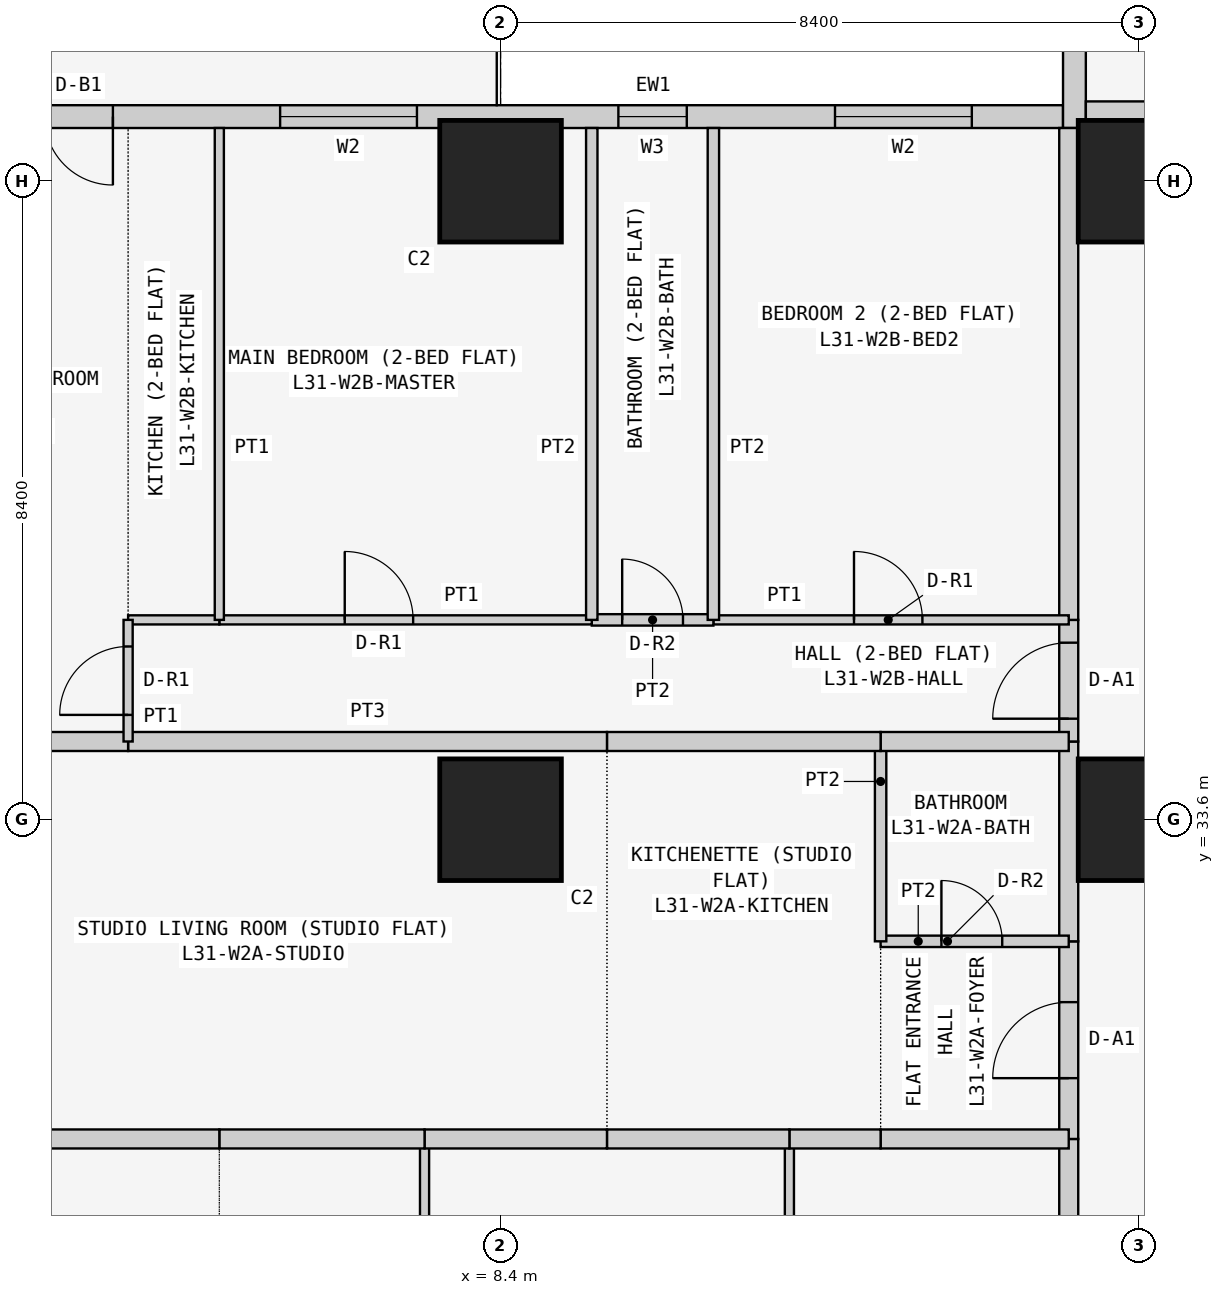
"""IFC4 building model, lengths in metres.
Left out: names, types, materials, properties, quantities, classifications, styles, units other than length and angle.
Written with IfcOpenShell. Run it as: python <this file> out.ifc"""

import sys

from ifc_helpers import new_model, si_unit, direction, frame, frame_2d, origin, origin_2d, place, context, subcontext, project, spatial, rectangle, extrude, element, fill, save


model = new_model("IFC4")
c1 = context("Model", 3, precision=1e-05, world=origin(), true_north=direction((0.0, 1.0)))
c2 = subcontext(c1, "Body", "Model", "MODEL_VIEW")
j1 = project(units=[si_unit("LENGTHUNIT", "METRE"), si_unit("PLANEANGLEUNIT", "RADIAN")], contexts=[c1])
p1 = place(None, origin())
s1 = spatial("IfcSite", under=j1, at=p1, CompositionType="ELEMENT")
p2 = place(p1, origin())
s2 = spatial("IfcBuilding", under=s1, at=p2, CompositionType="ELEMENT")
p3 = place(p2, frame((0.0, 0.0, 123.3)))
s3 = spatial("IfcBuildingStorey", under=s2, at=p3, CompositionType="ELEMENT", Elevation=123.3)
for number, where, z_axis, x_axis in (
    (1, (8.4, 33.6, 0.0), (0.0, 0.0, 1.0), (1.0, 0.0, 0.0)),
    (2, (8.4, 42.0, 0.0), (0.0, 0.0, 1.0), (1.0, 0.0, 0.0)),
    (3, (16.8, 33.6, 0.0), (0.0, 0.0, 1.0), (1.0, 0.0, 0.0)),
    (4, (16.8, 42.0, 0.0), (0.0, 0.0, 1.0), (1.0, 0.0, 0.0)),
):
    element("IfcColumn", number, at=place(p3, frame(where, z_axis=z_axis, x_axis=x_axis)), inside=s3, PredefinedType="COLUMN", context=c2, shape_type="SweptSolid", body=[
        extrude(rectangle(XDim=1.6, YDim=1.6, at=origin_2d()), origin(), (0.0, 0.0, 1.0), 3.6),
    ])
p4 = place(p3, frame((15.8, 42.85, 0.0), z_axis=(0.0, 0.0, 1.0), x_axis=(-1.0, 0.0, 0.0)))
e5 = element("IfcWall", 5, at=p4, inside=s3, PredefinedType="SOLIDWALL", context=c2, shape_type="SweptSolid", body=[
    extrude(rectangle(XDim=15.4, YDim=0.3, at=frame_2d((7.7, 0.0))), origin(), (0.0, 0.0, 1.0), 3.45),
])
p5 = place(p4, frame((1.2, 0.0, 0.9)))
e6 = element("IfcOpeningElement", 6, at=p5, cuts=e5, PredefinedType="OPENING", context=c2, shape_type="SweptSolid", body=[
    extrude(rectangle(XDim=1.8, YDim=1.5, at=frame_2d((0.9, 0.75))), frame((0.0, 0.16, 0.0), z_axis=(0.0, -1.0, 0.0), x_axis=(1.0, 0.0, 0.0)), (0.0, 0.0, 1.0), 0.32),
])
p6 = place(p4, frame((4.95, 0.0, 1.5)))
e7 = element("IfcOpeningElement", 7, at=p6, cuts=e5, PredefinedType="OPENING", context=c2, shape_type="SweptSolid", body=[
    extrude(rectangle(XDim=0.9, YDim=0.7, at=frame_2d((0.45, 0.35))), frame((0.0, 0.16, 0.0), z_axis=(0.0, -1.0, 0.0), x_axis=(1.0, 0.0, 0.0)), (0.0, 0.0, 1.0), 0.32),
])
p7 = place(p4, frame((8.5, 0.0, 0.9)))
e8 = element("IfcOpeningElement", 8, at=p7, cuts=e5, PredefinedType="OPENING", context=c2, shape_type="SweptSolid", body=[
    extrude(rectangle(XDim=1.8, YDim=1.5, at=frame_2d((0.9, 0.75))), frame((0.0, 0.16, 0.0), z_axis=(0.0, -1.0, 0.0), x_axis=(1.0, 0.0, 0.0)), (0.0, 0.0, 1.0), 0.32),
])
p8 = place(p4, frame((12.5, 0.0, 0.0)))
e9 = element("IfcOpeningElement", 9, at=p8, cuts=e5, PredefinedType="OPENING", context=c2, shape_type="SweptSolid", body=[
    extrude(rectangle(XDim=0.9, YDim=2.4, at=frame_2d((0.45, 1.2))), frame((0.0, 0.16, 0.0), z_axis=(0.0, -1.0, 0.0), x_axis=(1.0, 0.0, 0.0)), (0.0, 0.0, 1.0), 0.32),
])
p9 = place(p4, frame((13.5, 0.0, 0.9)))
e10 = element("IfcOpeningElement", 10, at=p9, cuts=e5, PredefinedType="OPENING", context=c2, shape_type="SweptSolid", body=[
    extrude(rectangle(XDim=1.2, YDim=1.5, at=frame_2d((0.6, 0.75))), frame((0.0, 0.16, 0.0), z_axis=(0.0, -1.0, 0.0), x_axis=(1.0, 0.0, 0.0)), (0.0, 0.0, 1.0), 0.32),
])
p10 = place(p3, frame((15.95, 50.0, 0.0), z_axis=(0.0, 0.0, 1.0), x_axis=(0.0, -1.0, 0.0)))
e11 = element("IfcWall", 11, at=p10, inside=s3, PredefinedType="SOLIDWALL", context=c2, shape_type="SweptSolid", body=[
    extrude(rectangle(XDim=7.3, YDim=0.3, at=frame_2d((3.65, 0.0))), origin(), (0.0, 0.0, 1.0), 3.45),
])
p11 = place(p10, frame((3.1, 0.0, 0.9)))
e12 = element("IfcOpeningElement", 12, at=p11, cuts=e11, PredefinedType="OPENING", context=c2, shape_type="SweptSolid", body=[
    extrude(rectangle(XDim=2.4, YDim=1.5, at=frame_2d((1.2, 0.75))), frame((0.0, 0.16, 0.0), z_axis=(0.0, -1.0, 0.0), x_axis=(1.0, 0.0, 0.0)), (0.0, 0.0, 1.0), 0.32),
])
p12 = place(p10, frame((0.75, 0.0, 0.9)))
e13 = element("IfcOpeningElement", 13, at=p12, cuts=e11, PredefinedType="OPENING", context=c2, shape_type="SweptSolid", body=[
    extrude(rectangle(XDim=1.2, YDim=1.5, at=frame_2d((0.6, 0.75))), frame((0.0, 0.16, 0.0), z_axis=(0.0, -1.0, 0.0), x_axis=(1.0, 0.0, 0.0)), (0.0, 0.0, 1.0), 0.32),
])
p13 = place(p3, frame((16.1, 42.925, 0.0), z_axis=(0.0, 0.0, 1.0), x_axis=(1.0, 0.0, 0.0)))
e14 = element("IfcWall", 14, at=p13, inside=s3, PredefinedType="PARTITIONING", context=c2, shape_type="SweptSolid", body=[
    extrude(rectangle(XDim=6.871, YDim=0.25, at=frame_2d((3.436, 0.0))), origin(), (0.0, 0.0, 1.0), 3.45),
])
p14 = place(p3, frame((15.875, 24.171, 0.0), z_axis=(0.0, 0.0, 1.0), x_axis=(0.0, 1.0, 0.0)))
e15 = element("IfcWall", 15, at=p14, inside=s3, PredefinedType="PARTITIONING", context=c2, shape_type="SweptSolid", body=[
    extrude(rectangle(XDim=5.229, YDim=0.25, at=frame_2d((2.615, 0.0))), origin(), (0.0, 0.0, 1.0), 3.45),
])
p15 = place(p14, frame((2.129, 0.0, 0.0)))
e16 = element("IfcOpeningElement", 16, at=p15, cuts=e15, PredefinedType="OPENING", context=c2, shape_type="SweptSolid", body=[
    extrude(rectangle(XDim=1.0, YDim=2.1, at=frame_2d((0.5, 1.05))), frame((0.0, 0.135, 0.0), z_axis=(0.0, -1.0, 0.0), x_axis=(1.0, 0.0, 0.0)), (0.0, 0.0, 1.0), 0.27),
])
p16 = place(p3, frame((15.875, 29.4, 0.0), z_axis=(0.0, 0.0, 1.0), x_axis=(0.0, 1.0, 0.0)))
e17 = element("IfcWall", 17, at=p16, inside=s3, PredefinedType="PARTITIONING", context=c2, shape_type="SweptSolid", body=[
    extrude(rectangle(XDim=2.6, YDim=0.25, at=frame_2d((1.3, 0.0))), origin(), (0.0, 0.0, 1.0), 3.45),
])
p17 = place(p16, frame((0.8, 0.0, 0.0)))
e18 = element("IfcOpeningElement", 18, at=p17, cuts=e17, PredefinedType="OPENING", context=c2, shape_type="SweptSolid", body=[
    extrude(rectangle(XDim=1.0, YDim=2.1, at=frame_2d((0.5, 1.05))), frame((0.0, 0.135, 0.0), z_axis=(0.0, -1.0, 0.0), x_axis=(1.0, 0.0, 0.0)), (0.0, 0.0, 1.0), 0.27),
])
p18 = place(p3, frame((15.875, 32.0, 0.0), z_axis=(0.0, 0.0, 1.0), x_axis=(0.0, 1.0, 0.0)))
e19 = element("IfcWall", 19, at=p18, inside=s3, PredefinedType="PARTITIONING", context=c2, shape_type="SweptSolid", body=[
    extrude(rectangle(XDim=2.629, YDim=0.25, at=frame_2d((1.314, 0.0))), origin(), (0.0, 0.0, 1.0), 3.45),
])
p19 = place(p3, frame((15.875, 34.629, 0.0), z_axis=(0.0, 0.0, 1.0), x_axis=(0.0, 1.0, 0.0)))
e20 = element("IfcWall", 20, at=p19, inside=s3, PredefinedType="PARTITIONING", context=c2, shape_type="SweptSolid", body=[
    extrude(rectangle(XDim=1.6, YDim=0.25, at=frame_2d((0.8, 0.0))), origin(), (0.0, 0.0, 1.0), 3.45),
])
p20 = place(p19, frame((0.3, 0.0, 0.0)))
e21 = element("IfcOpeningElement", 21, at=p20, cuts=e20, PredefinedType="OPENING", context=c2, shape_type="SweptSolid", body=[
    extrude(rectangle(XDim=1.0, YDim=2.1, at=frame_2d((0.5, 1.05))), frame((0.0, 0.135, 0.0), z_axis=(0.0, -1.0, 0.0), x_axis=(1.0, 0.0, 0.0)), (0.0, 0.0, 1.0), 0.27),
])
p21 = place(p3, frame((15.875, 36.229, 0.0), z_axis=(0.0, 0.0, 1.0), x_axis=(0.0, 1.0, 0.0)))
e22 = element("IfcWall", 22, at=p21, inside=s3, PredefinedType="PARTITIONING", context=c2, shape_type="SweptSolid", body=[
    extrude(rectangle(XDim=6.471, YDim=0.25, at=frame_2d((3.235, 0.0))), origin(), (0.0, 0.0, 1.0), 3.45),
])
p22 = place(p3, frame((12.2, 29.4, 0.0), z_axis=(0.0, 0.0, 1.0), x_axis=(0.0, -1.0, 0.0)))
e23 = element("IfcWall", 23, at=p22, inside=s3, PredefinedType="PARTITIONING", context=c2, shape_type="SweptSolid", body=[
    extrude(rectangle(XDim=5.229, YDim=0.12, at=frame_2d((2.615, 0.0))), origin(), (0.0, 0.0, 1.0), 3.45),
])
p23 = place(p3, frame((15.875, 29.4, 0.0), z_axis=(0.0, 0.0, 1.0), x_axis=(-1.0, 0.0, 0.0)))
e24 = element("IfcWall", 24, at=p23, inside=s3, PredefinedType="PARTITIONING", context=c2, shape_type="SweptSolid", body=[
    extrude(rectangle(XDim=2.475, YDim=0.25, at=frame_2d((1.238, 0.0))), origin(), (0.0, 0.0, 1.0), 3.45),
])
p24 = place(p3, frame((13.4, 29.4, 0.0), z_axis=(0.0, 0.0, 1.0), x_axis=(-1.0, 0.0, 0.0)))
e25 = element("IfcWall", 25, at=p24, inside=s3, PredefinedType="PARTITIONING", context=c2, shape_type="SweptSolid", body=[
    extrude(rectangle(XDim=1.2, YDim=0.25, at=frame_2d((0.6, 0.0))), origin(), (0.0, 0.0, 1.0), 3.45),
])
p25 = place(p3, frame((7.4, 29.4, 0.0), z_axis=(0.0, 0.0, 1.0), x_axis=(0.0, -1.0, 0.0)))
e26 = element("IfcWall", 26, at=p25, inside=s3, PredefinedType="PARTITIONING", context=c2, shape_type="SweptSolid", body=[
    extrude(rectangle(XDim=5.229, YDim=0.12, at=frame_2d((2.615, 0.0))), origin(), (0.0, 0.0, 1.0), 3.45),
])
p26 = place(p3, frame((12.2, 29.4, 0.0), z_axis=(0.0, 0.0, 1.0), x_axis=(-1.0, 0.0, 0.0)))
e27 = element("IfcWall", 27, at=p26, inside=s3, PredefinedType="PARTITIONING", context=c2, shape_type="SweptSolid", body=[
    extrude(rectangle(XDim=2.4, YDim=0.25, at=frame_2d((1.2, 0.0))), origin(), (0.0, 0.0, 1.0), 3.45),
])
p27 = place(p3, frame((9.8, 29.4, 0.0), z_axis=(0.0, 0.0, 1.0), x_axis=(-1.0, 0.0, 0.0)))
e28 = element("IfcWall", 28, at=p27, inside=s3, PredefinedType="PARTITIONING", context=c2, shape_type="SweptSolid", body=[
    extrude(rectangle(XDim=2.4, YDim=0.25, at=frame_2d((1.2, 0.0))), origin(), (0.0, 0.0, 1.0), 3.45),
])
p28 = place(p3, frame((7.4, 29.4, 0.0), z_axis=(0.0, 0.0, 1.0), x_axis=(-1.0, 0.0, 0.0)))
e29 = element("IfcWall", 29, at=p28, inside=s3, PredefinedType="PARTITIONING", context=c2, shape_type="SweptSolid", body=[
    extrude(rectangle(XDim=2.7, YDim=0.25, at=frame_2d((1.35, 0.0))), origin(), (0.0, 0.0, 1.0), 3.45),
])
p29 = place(p3, frame((4.7, 29.4, 0.0), z_axis=(0.0, 0.0, 1.0), x_axis=(-1.0, 0.0, 0.0)))
e30 = element("IfcWall", 30, at=p29, inside=s3, PredefinedType="PARTITIONING", context=c2, shape_type="SweptSolid", body=[
    extrude(rectangle(XDim=5.35, YDim=0.25, at=frame_2d((2.675, 0.0))), origin(), (0.0, 0.0, 1.0), 3.45),
])
p30 = place(p3, frame((13.4, 32.0, 0.0), z_axis=(0.0, 0.0, 1.0), x_axis=(1.0, 0.0, 0.0)))
e31 = element("IfcWall", 31, at=p30, inside=s3, PredefinedType="PARTITIONING", context=c2, shape_type="SweptSolid", body=[
    extrude(rectangle(XDim=2.475, YDim=0.15, at=frame_2d((1.238, 0.0))), origin(), (0.0, 0.0, 1.0), 3.45),
])
p31 = place(p30, frame((0.8, 0.0, 0.0)))
e32 = element("IfcOpeningElement", 32, at=p31, cuts=e31, PredefinedType="OPENING", context=c2, shape_type="SweptSolid", body=[
    extrude(rectangle(XDim=0.8, YDim=2.1, at=frame_2d((0.4, 1.05))), frame((0.0, 0.085, 0.0), z_axis=(0.0, -1.0, 0.0), x_axis=(1.0, 0.0, 0.0)), (0.0, 0.0, 1.0), 0.17),
])
p32 = place(p3, frame((13.4, 32.0, 0.0), z_axis=(0.0, 0.0, 1.0), x_axis=(0.0, 1.0, 0.0)))
e33 = element("IfcWall", 33, at=p32, inside=s3, PredefinedType="PARTITIONING", context=c2, shape_type="SweptSolid", body=[
    extrude(rectangle(XDim=2.629, YDim=0.15, at=frame_2d((1.314, 0.0))), origin(), (0.0, 0.0, 1.0), 3.45),
])
p33 = place(p3, frame((13.4, 34.629, 0.0), z_axis=(0.0, 0.0, 1.0), x_axis=(1.0, 0.0, 0.0)))
e34 = element("IfcWall", 34, at=p33, inside=s3, PredefinedType="PARTITIONING", context=c2, shape_type="SweptSolid", body=[
    extrude(rectangle(XDim=2.475, YDim=0.25, at=frame_2d((1.238, 0.0))), origin(), (0.0, 0.0, 1.0), 3.45),
])
p34 = place(p3, frame((9.8, 34.629, 0.0), z_axis=(0.0, 0.0, 1.0), x_axis=(1.0, 0.0, 0.0)))
e35 = element("IfcWall", 35, at=p34, inside=s3, PredefinedType="PARTITIONING", context=c2, shape_type="SweptSolid", body=[
    extrude(rectangle(XDim=3.6, YDim=0.25, at=frame_2d((1.8, 0.0))), origin(), (0.0, 0.0, 1.0), 3.45),
])
p35 = place(p3, frame((3.5, 34.629, 0.0), z_axis=(0.0, 0.0, 1.0), x_axis=(1.0, 0.0, 0.0)))
e36 = element("IfcWall", 36, at=p35, inside=s3, PredefinedType="PARTITIONING", context=c2, shape_type="SweptSolid", body=[
    extrude(rectangle(XDim=6.3, YDim=0.25, at=frame_2d((3.15, 0.0))), origin(), (0.0, 0.0, 1.0), 3.45),
])
p36 = place(p3, frame((-0.65, 34.629, 0.0), z_axis=(0.0, 0.0, 1.0), x_axis=(1.0, 0.0, 0.0)))
e37 = element("IfcWall", 37, at=p36, inside=s3, PredefinedType="PARTITIONING", context=c2, shape_type="SweptSolid", body=[
    extrude(rectangle(XDim=4.15, YDim=0.25, at=frame_2d((2.075, 0.0))), origin(), (0.0, 0.0, 1.0), 3.45),
])
p37 = place(p3, frame((11.2, 36.229, 0.0), z_axis=(0.0, 0.0, 1.0), x_axis=(1.0, 0.0, 0.0)))
e38 = element("IfcWall", 38, at=p37, inside=s3, PredefinedType="PARTITIONING", context=c2, shape_type="SweptSolid", body=[
    extrude(rectangle(XDim=4.675, YDim=0.12, at=frame_2d((2.337, 0.0))), origin(), (0.0, 0.0, 1.0), 3.45),
])
p38 = place(p37, frame((1.85, 0.0, 0.0)))
e39 = element("IfcOpeningElement", 39, at=p38, cuts=e38, PredefinedType="OPENING", context=c2, shape_type="SweptSolid", body=[
    extrude(rectangle(XDim=0.9, YDim=2.1, at=frame_2d((0.45, 1.05))), frame((0.0, 0.07, 0.0), z_axis=(0.0, -1.0, 0.0), x_axis=(1.0, 0.0, 0.0)), (0.0, 0.0, 1.0), 0.14),
])
p39 = place(p3, frame((9.6, 36.229, 0.0), z_axis=(0.0, 0.0, 1.0), x_axis=(1.0, 0.0, 0.0)))
e40 = element("IfcWall", 40, at=p39, inside=s3, PredefinedType="PARTITIONING", context=c2, shape_type="SweptSolid", body=[
    extrude(rectangle(XDim=1.6, YDim=0.15, at=frame_2d((0.8, 0.0))), origin(), (0.0, 0.0, 1.0), 3.45),
])
p40 = place(p39, frame((0.4, 0.0, 0.0)))
e41 = element("IfcOpeningElement", 41, at=p40, cuts=e40, PredefinedType="OPENING", context=c2, shape_type="SweptSolid", body=[
    extrude(rectangle(XDim=0.8, YDim=2.1, at=frame_2d((0.4, 1.05))), frame((0.0, 0.085, 0.0), z_axis=(0.0, -1.0, 0.0), x_axis=(1.0, 0.0, 0.0)), (0.0, 0.0, 1.0), 0.17),
])
p41 = place(p3, frame((4.7, 36.229, 0.0), z_axis=(0.0, 0.0, 1.0), x_axis=(1.0, 0.0, 0.0)))
e42 = element("IfcWall", 42, at=p41, inside=s3, PredefinedType="PARTITIONING", context=c2, shape_type="SweptSolid", body=[
    extrude(rectangle(XDim=4.9, YDim=0.12, at=frame_2d((2.45, 0.0))), origin(), (0.0, 0.0, 1.0), 3.45),
])
p42 = place(p41, frame((1.65, 0.0, 0.0)))
e43 = element("IfcOpeningElement", 43, at=p42, cuts=e42, PredefinedType="OPENING", context=c2, shape_type="SweptSolid", body=[
    extrude(rectangle(XDim=0.9, YDim=2.1, at=frame_2d((0.45, 1.05))), frame((0.0, 0.07, 0.0), z_axis=(0.0, -1.0, 0.0), x_axis=(1.0, 0.0, 0.0)), (0.0, 0.0, 1.0), 0.14),
])
p43 = place(p3, frame((3.5, 36.229, 0.0), z_axis=(0.0, 0.0, 1.0), x_axis=(1.0, 0.0, 0.0)))
e44 = element("IfcWall", 44, at=p43, inside=s3, PredefinedType="PARTITIONING", context=c2, shape_type="SweptSolid", body=[
    extrude(rectangle(XDim=1.2, YDim=0.12, at=frame_2d((0.6, 0.0))), origin(), (0.0, 0.0, 1.0), 3.45),
])
p44 = place(p3, frame((3.5, 34.629, 0.0), z_axis=(0.0, 0.0, 1.0), x_axis=(0.0, 1.0, 0.0)))
e45 = element("IfcWall", 45, at=p44, inside=s3, PredefinedType="PARTITIONING", context=c2, shape_type="SweptSolid", body=[
    extrude(rectangle(XDim=1.6, YDim=0.12, at=frame_2d((0.8, 0.0))), origin(), (0.0, 0.0, 1.0), 3.45),
])
p45 = place(p44, frame((0.35, 0.0, 0.0)))
e46 = element("IfcOpeningElement", 46, at=p45, cuts=e45, PredefinedType="OPENING", context=c2, shape_type="SweptSolid", body=[
    extrude(rectangle(XDim=0.9, YDim=2.1, at=frame_2d((0.45, 1.05))), frame((0.0, 0.07, 0.0), z_axis=(0.0, -1.0, 0.0), x_axis=(1.0, 0.0, 0.0)), (0.0, 0.0, 1.0), 0.14),
])
for number, where, z_axis, x_axis in (
    (47, (11.2, 36.229, 0.0), (0.0, 0.0, 1.0), (0.0, 1.0, 0.0)),
    (48, (9.6, 36.229, 0.0), (0.0, 0.0, 1.0), (0.0, 1.0, 0.0)),
):
    element("IfcWall", number, at=place(p3, frame(where, z_axis=z_axis, x_axis=x_axis)), inside=s3, PredefinedType="PARTITIONING", context=c2, shape_type="SweptSolid", body=[
        extrude(rectangle(XDim=6.471, YDim=0.15, at=frame_2d((3.235, 0.0))), origin(), (0.0, 0.0, 1.0), 3.45),
    ])
p46 = place(p3, frame((4.7, 36.229, 0.0), z_axis=(0.0, 0.0, 1.0), x_axis=(0.0, 1.0, 0.0)))
e49 = element("IfcWall", 49, at=p46, inside=s3, PredefinedType="PARTITIONING", context=c2, shape_type="SweptSolid", body=[
    extrude(rectangle(XDim=6.471, YDim=0.12, at=frame_2d((3.235, 0.0))), origin(), (0.0, 0.0, 1.0), 3.45),
])
p47 = place(p5, origin())
e50 = element("IfcWindow", 50, at=p47, inside=s3, PartitioningType="SINGLE_PANEL", PredefinedType="WINDOW", context=c2, shape_type="SweptSolid", body=[
    extrude(rectangle(XDim=1.8, YDim=1.5, at=frame_2d((0.9, 0.75))), frame((0.0, 0.03, 0.0), z_axis=(0.0, -1.0, 0.0), x_axis=(1.0, 0.0, 0.0)), (0.0, 0.0, 1.0), 0.06),
])
fill(e6, e50)
p48 = place(p6, origin())
e51 = element("IfcWindow", 51, at=p48, inside=s3, PartitioningType="SINGLE_PANEL", PredefinedType="WINDOW", context=c2, shape_type="SweptSolid", body=[
    extrude(rectangle(XDim=0.9, YDim=0.7, at=frame_2d((0.45, 0.35))), frame((0.0, 0.03, 0.0), z_axis=(0.0, -1.0, 0.0), x_axis=(1.0, 0.0, 0.0)), (0.0, 0.0, 1.0), 0.06),
])
fill(e7, e51)
p49 = place(p7, origin())
e52 = element("IfcWindow", 52, at=p49, inside=s3, PartitioningType="SINGLE_PANEL", PredefinedType="WINDOW", context=c2, shape_type="SweptSolid", body=[
    extrude(rectangle(XDim=1.8, YDim=1.5, at=frame_2d((0.9, 0.75))), frame((0.0, 0.03, 0.0), z_axis=(0.0, -1.0, 0.0), x_axis=(1.0, 0.0, 0.0)), (0.0, 0.0, 1.0), 0.06),
])
fill(e8, e52)
p50 = place(p8, origin())
e53 = element("IfcDoor", 53, at=p50, inside=s3, OperationType="SINGLE_SWING_LEFT", PredefinedType="DOOR", context=c2, shape_type="SweptSolid", body=[
    extrude(rectangle(XDim=0.9, YDim=2.4, at=frame_2d((0.45, 1.2))), frame((0.0, 0.025, 0.0), z_axis=(0.0, -1.0, 0.0), x_axis=(1.0, 0.0, 0.0)), (0.0, 0.0, 1.0), 0.05),
])
fill(e9, e53)
p51 = place(p17, origin())
e54 = element("IfcDoor", 54, at=p51, inside=s3, OperationType="SINGLE_SWING_LEFT", PredefinedType="DOOR", context=c2, shape_type="SweptSolid", body=[
    extrude(rectangle(XDim=1.0, YDim=2.1, at=frame_2d((0.5, 1.05))), frame((0.0, 0.025, 0.0), z_axis=(0.0, -1.0, 0.0), x_axis=(1.0, 0.0, 0.0)), (0.0, 0.0, 1.0), 0.05),
])
fill(e18, e54)
p52 = place(p31, origin())
e55 = element("IfcDoor", 55, at=p52, inside=s3, OperationType="SINGLE_SWING_LEFT", PredefinedType="DOOR", context=c2, shape_type="SweptSolid", body=[
    extrude(rectangle(XDim=0.8, YDim=2.1, at=frame_2d((0.4, 1.05))), frame((0.0, 0.025, 0.0), z_axis=(0.0, -1.0, 0.0), x_axis=(1.0, 0.0, 0.0)), (0.0, 0.0, 1.0), 0.05),
])
fill(e32, e55)
p53 = place(p20, origin())
e56 = element("IfcDoor", 56, at=p53, inside=s3, OperationType="SINGLE_SWING_LEFT", PredefinedType="DOOR", context=c2, shape_type="SweptSolid", body=[
    extrude(rectangle(XDim=1.0, YDim=2.1, at=frame_2d((0.5, 1.05))), frame((0.0, 0.025, 0.0), z_axis=(0.0, -1.0, 0.0), x_axis=(1.0, 0.0, 0.0)), (0.0, 0.0, 1.0), 0.05),
])
fill(e21, e56)
p54 = place(p38, origin())
e57 = element("IfcDoor", 57, at=p54, inside=s3, OperationType="SINGLE_SWING_LEFT", PredefinedType="DOOR", context=c2, shape_type="SweptSolid", body=[
    extrude(rectangle(XDim=0.9, YDim=2.1, at=frame_2d((0.45, 1.05))), frame((0.0, 0.025, 0.0), z_axis=(0.0, -1.0, 0.0), x_axis=(1.0, 0.0, 0.0)), (0.0, 0.0, 1.0), 0.05),
])
fill(e39, e57)
p55 = place(p40, origin())
e58 = element("IfcDoor", 58, at=p55, inside=s3, OperationType="SINGLE_SWING_LEFT", PredefinedType="DOOR", context=c2, shape_type="SweptSolid", body=[
    extrude(rectangle(XDim=0.8, YDim=2.1, at=frame_2d((0.4, 1.05))), frame((0.0, 0.025, 0.0), z_axis=(0.0, -1.0, 0.0), x_axis=(1.0, 0.0, 0.0)), (0.0, 0.0, 1.0), 0.05),
])
fill(e41, e58)
p56 = place(p42, origin())
e59 = element("IfcDoor", 59, at=p56, inside=s3, OperationType="SINGLE_SWING_LEFT", PredefinedType="DOOR", context=c2, shape_type="SweptSolid", body=[
    extrude(rectangle(XDim=0.9, YDim=2.1, at=frame_2d((0.45, 1.05))), frame((0.0, 0.025, 0.0), z_axis=(0.0, -1.0, 0.0), x_axis=(1.0, 0.0, 0.0)), (0.0, 0.0, 1.0), 0.05),
])
fill(e43, e59)
p57 = place(p45, origin())
e60 = element("IfcDoor", 60, at=p57, inside=s3, OperationType="SINGLE_SWING_LEFT", PredefinedType="DOOR", context=c2, shape_type="SweptSolid", body=[
    extrude(rectangle(XDim=0.9, YDim=2.1, at=frame_2d((0.45, 1.05))), frame((0.0, 0.025, 0.0), z_axis=(0.0, -1.0, 0.0), x_axis=(1.0, 0.0, 0.0)), (0.0, 0.0, 1.0), 0.05),
])
fill(e46, e60)
save(model, sys.argv[1])
